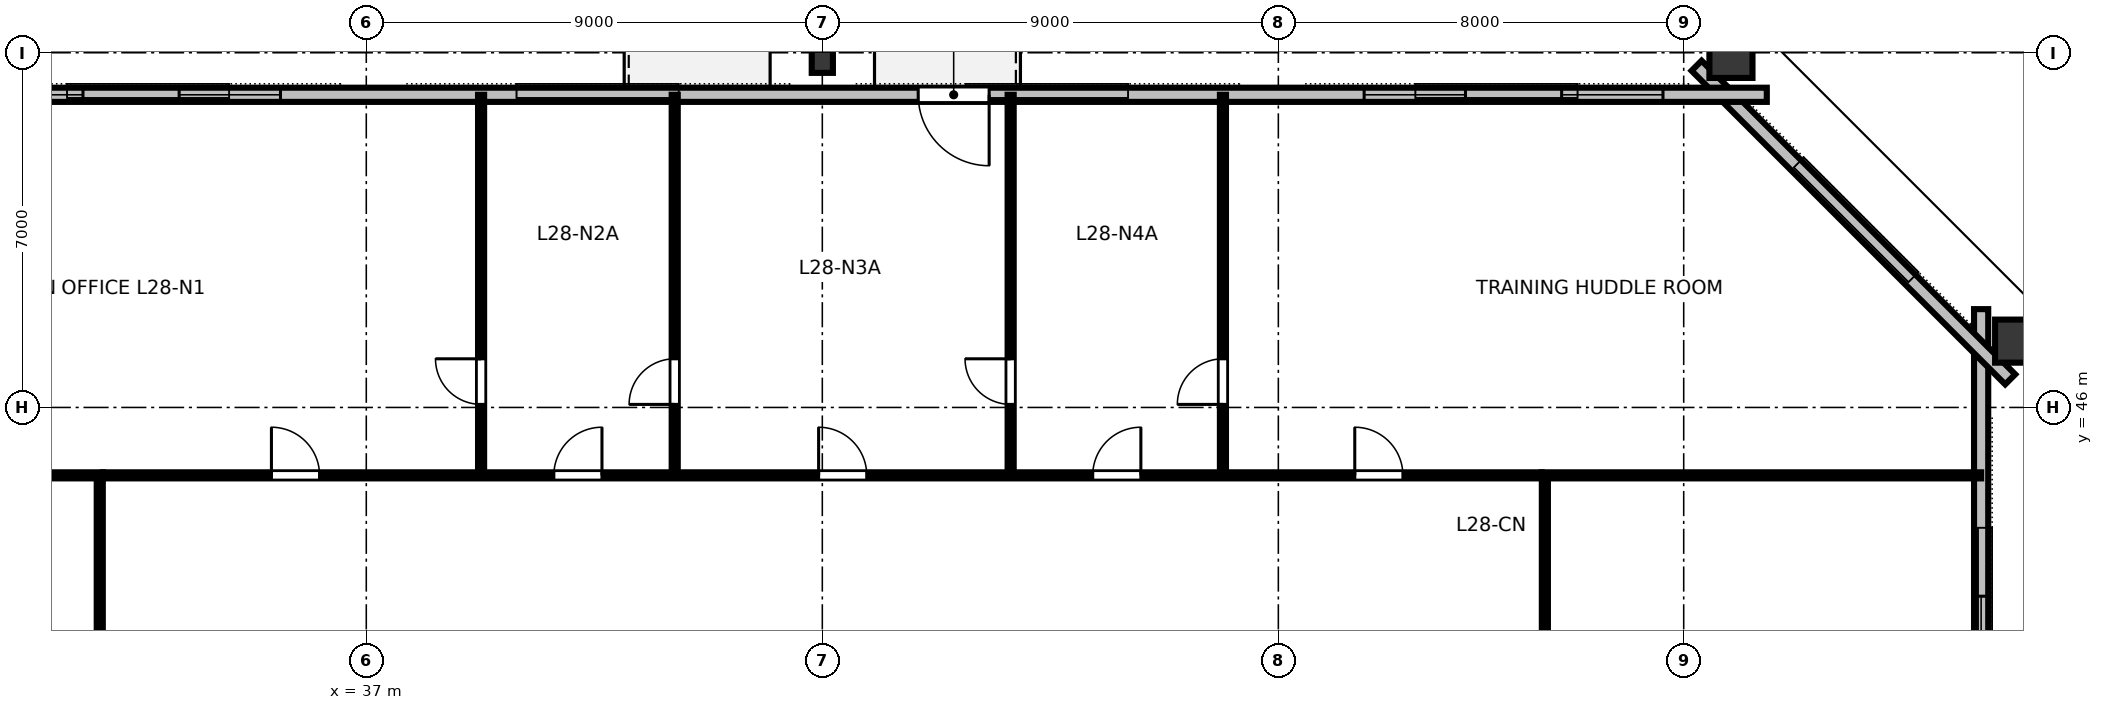
"""IFC4 building model, lengths in metres.
Left out: names, types, materials, properties, quantities, classifications, styles, units other than length and angle.
Written with IfcOpenShell. Run it as: python <this file> out.ifc"""

import sys

from ifc_helpers import new_model, si_unit, direction, frame, frame_2d, origin, origin_2d, place, context, subcontext, project, spatial, rectangle, hollow_rectangle, i_section, extrude, element, fill, save


model = new_model("IFC4")
c1 = context("Model", 3, precision=1e-05, world=origin(), true_north=direction((0.0, 1.0)))
c2 = subcontext(c1, "Body", "Model", "MODEL_VIEW")
j1 = project(units=[si_unit("LENGTHUNIT", "METRE"), si_unit("PLANEANGLEUNIT", "RADIAN")], contexts=[c1])
p1 = place(None, origin())
s1 = spatial("IfcSite", under=j1, at=p1, CompositionType="ELEMENT")
p2 = place(p1, origin())
s2 = spatial("IfcBuilding", under=s1, at=p2, CompositionType="ELEMENT")
p3 = place(p2, frame((0.0, 0.0, 109.6)))
s3 = spatial("IfcBuildingStorey", under=s2, at=p3, CompositionType="ELEMENT", Elevation=109.6)
for number, where, z_axis, x_axis in (
    (1, (69.646, 47.309, 0.0), (0.0, 0.0, 1.0), (0.0, 1.0, 0.0)),
    (2, (63.933, 53.002, 0.0), (0.0, 0.0, 1.0), (1.0, 0.0, 0.0)),
):
    element("IfcColumn", number, at=place(p3, frame(where, z_axis=z_axis, x_axis=x_axis)), inside=s3, PredefinedType="COLUMN", context=c2, shape_type="SweptSolid", body=[
        extrude(hollow_rectangle(XDim=0.85, YDim=1.0, WallThickness=0.05, at=origin_2d()), origin(), (0.0, 0.0, 1.0), 3.358),
    ])
p4 = place(p3, frame((46.0, 52.83, 0.0), z_axis=(0.0, 0.0, 1.0), x_axis=(1.0, 0.0, 0.0)))
e3 = element("IfcColumn", 3, at=p4, inside=s3, PredefinedType="COLUMN", context=c2, shape_type="SweptSolid", body=[
    extrude(i_section(OverallWidth=0.418, OverallDepth=0.455, WebThickness=0.042, FlangeThickness=0.068, FilletRadius=0.025, at=origin_2d()), origin(), (0.0, 0.0, 1.0), 3.358),
])
p5 = place(p3, frame((68.87, 16.06, 0.0), z_axis=(0.0, 0.0, 1.0), x_axis=(0.0, 1.0, 0.0)))
e4 = element("IfcWall", 4, at=p5, inside=s3, PredefinedType="STANDARD", context=c2, shape_type="SweptSolid", body=[
    extrude(rectangle(XDim=31.88, YDim=0.28, at=frame_2d((15.94, 0.0))), origin(), (0.0, 0.0, 1.0), 3.36),
])
p6 = place(p5, frame((5.665, 0.0, 0.8)))
e5 = element("IfcOpeningElement", 5, at=p6, cuts=e4, PredefinedType="OPENING", context=c2, shape_type="SweptSolid", body=[
    extrude(rectangle(XDim=2.0, YDim=1.95, at=frame_2d((1.0, 0.975))), frame((0.0, 0.15, 0.0), z_axis=(0.0, -1.0, 0.0), x_axis=(1.0, 0.0, 0.0)), (0.0, 0.0, 1.0), 0.3),
])
p7 = place(p5, frame((9.375, 0.0, 0.8)))
e6 = element("IfcOpeningElement", 6, at=p7, cuts=e4, PredefinedType="OPENING", context=c2, shape_type="SweptSolid", body=[
    extrude(rectangle(XDim=2.0, YDim=1.95, at=frame_2d((1.0, 0.975))), frame((0.0, 0.15, 0.0), z_axis=(0.0, -1.0, 0.0), x_axis=(1.0, 0.0, 0.0)), (0.0, 0.0, 1.0), 0.3),
])
p8 = place(p5, frame((20.505, 0.0, 0.8)))
e7 = element("IfcOpeningElement", 7, at=p8, cuts=e4, PredefinedType="OPENING", context=c2, shape_type="SweptSolid", body=[
    extrude(rectangle(XDim=2.0, YDim=1.95, at=frame_2d((1.0, 0.975))), frame((0.0, 0.15, 0.0), z_axis=(0.0, -1.0, 0.0), x_axis=(1.0, 0.0, 0.0)), (0.0, 0.0, 1.0), 0.3),
])
p9 = place(p5, frame((24.215, 0.0, 0.8)))
e8 = element("IfcOpeningElement", 8, at=p9, cuts=e4, PredefinedType="OPENING", context=c2, shape_type="SweptSolid", body=[
    extrude(rectangle(XDim=2.0, YDim=1.95, at=frame_2d((1.0, 0.975))), frame((0.0, 0.15, 0.0), z_axis=(0.0, -1.0, 0.0), x_axis=(1.0, 0.0, 0.0)), (0.0, 0.0, 1.0), 0.3),
])
p10 = place(p3, frame((69.444, 46.554, 0.0), z_axis=(0.0, 0.0, 1.0), x_axis=(-0.707106781187, 0.707106781187, 0.0)))
e9 = element("IfcWall", 9, at=p10, inside=s3, PredefinedType="STANDARD", context=c2, shape_type="SweptSolid", body=[
    extrude(rectangle(XDim=8.753, YDim=0.28, at=frame_2d((4.376, 0.0))), origin(), (0.0, 0.0, 1.0), 3.36),
])
p11 = place(p3, frame((64.64, 52.17, 0.0), z_axis=(0.0, 0.0, 1.0), x_axis=(-1.0, 0.0, 0.0)))
e10 = element("IfcWall", 10, at=p11, inside=s3, PredefinedType="STANDARD", context=c2, shape_type="SweptSolid", body=[
    extrude(rectangle(XDim=37.28, YDim=0.28, at=frame_2d((18.64, 0.0))), origin(), (0.0, 0.0, 1.0), 3.36),
])
p12 = place(p11, frame((15.347, 0.0, 0.0)))
e11 = element("IfcOpeningElement", 11, at=p12, cuts=e10, PredefinedType="OPENING", context=c2, shape_type="SweptSolid", body=[
    extrude(rectangle(XDim=1.4, YDim=2.15, at=frame_2d((0.7, 1.075))), frame((0.0, 0.15, 0.0), z_axis=(0.0, -1.0, 0.0), x_axis=(1.0, 0.0, 0.0)), (0.0, 0.0, 1.0), 0.3),
])
p13 = place(p11, frame((2.049, 0.0, 0.8)))
e12 = element("IfcOpeningElement", 12, at=p13, cuts=e10, PredefinedType="OPENING", context=c2, shape_type="SweptSolid", body=[
    extrude(rectangle(XDim=2.0, YDim=1.95, at=frame_2d((1.0, 0.975))), frame((0.0, 0.15, 0.0), z_axis=(0.0, -1.0, 0.0), x_axis=(1.0, 0.0, 0.0)), (0.0, 0.0, 1.0), 0.3),
])
p14 = place(p11, frame((5.947, 0.0, 0.8)))
e13 = element("IfcOpeningElement", 13, at=p14, cuts=e10, PredefinedType="OPENING", context=c2, shape_type="SweptSolid", body=[
    extrude(rectangle(XDim=2.0, YDim=1.95, at=frame_2d((1.0, 0.975))), frame((0.0, 0.15, 0.0), z_axis=(0.0, -1.0, 0.0), x_axis=(1.0, 0.0, 0.0)), (0.0, 0.0, 1.0), 0.3),
])
p15 = place(p11, frame((29.333, 0.0, 0.8)))
e14 = element("IfcOpeningElement", 14, at=p15, cuts=e10, PredefinedType="OPENING", context=c2, shape_type="SweptSolid", body=[
    extrude(rectangle(XDim=2.0, YDim=1.95, at=frame_2d((1.0, 0.975))), frame((0.0, 0.15, 0.0), z_axis=(0.0, -1.0, 0.0), x_axis=(1.0, 0.0, 0.0)), (0.0, 0.0, 1.0), 0.3),
])
p16 = place(p11, frame((33.231, 0.0, 0.8)))
e15 = element("IfcOpeningElement", 15, at=p16, cuts=e10, PredefinedType="OPENING", context=c2, shape_type="SweptSolid", body=[
    extrude(rectangle(XDim=2.0, YDim=1.95, at=frame_2d((1.0, 0.975))), frame((0.0, 0.15, 0.0), z_axis=(0.0, -1.0, 0.0), x_axis=(1.0, 0.0, 0.0)), (0.0, 0.0, 1.0), 0.3),
])
p17 = place(p3, frame((39.266, 44.66, 0.0), z_axis=(0.0, 0.0, 1.0), x_axis=(0.0, 1.0, 0.0)))
e16 = element("IfcWall", 16, at=p17, inside=s3, PredefinedType="PARTITIONING", context=c2, shape_type="SweptSolid", body=[
    extrude(rectangle(XDim=7.51, YDim=0.12, at=frame_2d((3.755, 0.0))), origin(), (0.0, 0.0, 1.0), 2.64),
])
p18 = place(p17, frame((1.4, 0.0, 0.0)))
e17 = element("IfcOpeningElement", 17, at=p18, cuts=e16, PredefinedType="OPENING", context=c2, shape_type="SweptSolid", body=[
    extrude(rectangle(XDim=0.9, YDim=2.15, at=frame_2d((0.45, 1.075))), frame((0.0, 0.07, 0.0), z_axis=(0.0, -1.0, 0.0), x_axis=(1.0, 0.0, 0.0)), (0.0, 0.0, 1.0), 0.14),
])
p19 = place(p3, frame((43.087, 44.66, 0.0), z_axis=(0.0, 0.0, 1.0), x_axis=(0.0, 1.0, 0.0)))
e18 = element("IfcWall", 18, at=p19, inside=s3, PredefinedType="PARTITIONING", context=c2, shape_type="SweptSolid", body=[
    extrude(rectangle(XDim=7.51, YDim=0.12, at=frame_2d((3.755, 0.0))), origin(), (0.0, 0.0, 1.0), 2.64),
])
p20 = place(p19, frame((1.4, 0.0, 0.0)))
e19 = element("IfcOpeningElement", 19, at=p20, cuts=e18, PredefinedType="OPENING", context=c2, shape_type="SweptSolid", body=[
    extrude(rectangle(XDim=0.9, YDim=2.15, at=frame_2d((0.45, 1.075))), frame((0.0, 0.07, 0.0), z_axis=(0.0, -1.0, 0.0), x_axis=(1.0, 0.0, 0.0)), (0.0, 0.0, 1.0), 0.14),
])
p21 = place(p3, frame((49.717, 44.66, 0.0), z_axis=(0.0, 0.0, 1.0), x_axis=(0.0, 1.0, 0.0)))
e20 = element("IfcWall", 20, at=p21, inside=s3, PredefinedType="PARTITIONING", context=c2, shape_type="SweptSolid", body=[
    extrude(rectangle(XDim=7.51, YDim=0.12, at=frame_2d((3.755, 0.0))), origin(), (0.0, 0.0, 1.0), 2.64),
])
p22 = place(p21, frame((1.4, 0.0, 0.0)))
e21 = element("IfcOpeningElement", 21, at=p22, cuts=e20, PredefinedType="OPENING", context=c2, shape_type="SweptSolid", body=[
    extrude(rectangle(XDim=0.9, YDim=2.15, at=frame_2d((0.45, 1.075))), frame((0.0, 0.07, 0.0), z_axis=(0.0, -1.0, 0.0), x_axis=(1.0, 0.0, 0.0)), (0.0, 0.0, 1.0), 0.14),
])
p23 = place(p3, frame((53.906, 44.66, 0.0), z_axis=(0.0, 0.0, 1.0), x_axis=(0.0, 1.0, 0.0)))
e22 = element("IfcWall", 22, at=p23, inside=s3, PredefinedType="PARTITIONING", context=c2, shape_type="SweptSolid", body=[
    extrude(rectangle(XDim=7.51, YDim=0.12, at=frame_2d((3.755, 0.0))), origin(), (0.0, 0.0, 1.0), 2.64),
])
p24 = place(p23, frame((1.4, 0.0, 0.0)))
e23 = element("IfcOpeningElement", 23, at=p24, cuts=e22, PredefinedType="OPENING", context=c2, shape_type="SweptSolid", body=[
    extrude(rectangle(XDim=0.9, YDim=2.15, at=frame_2d((0.45, 1.075))), frame((0.0, 0.07, 0.0), z_axis=(0.0, -1.0, 0.0), x_axis=(1.0, 0.0, 0.0)), (0.0, 0.0, 1.0), 0.14),
])
p25 = place(p3, frame((31.8, 44.66, 0.0), z_axis=(0.0, 0.0, 1.0), x_axis=(1.0, 0.0, 0.0)))
e24 = element("IfcWall", 24, at=p25, inside=s3, PredefinedType="PARTITIONING", context=c2, shape_type="SweptSolid", body=[
    extrude(rectangle(XDim=28.4, YDim=0.12, at=frame_2d((14.2, 0.0))), origin(), (0.0, 0.0, 1.0), 2.64),
])
p26 = place(p25, frame((3.328, 0.0, 0.0)))
e25 = element("IfcOpeningElement", 25, at=p26, cuts=e24, PredefinedType="OPENING", context=c2, shape_type="SweptSolid", body=[
    extrude(rectangle(XDim=0.95, YDim=2.15, at=frame_2d((0.475, 1.075))), frame((0.0, 0.07, 0.0), z_axis=(0.0, -1.0, 0.0), x_axis=(1.0, 0.0, 0.0)), (0.0, 0.0, 1.0), 0.14),
])
p27 = place(p25, frame((8.901, 0.0, 0.0)))
e26 = element("IfcOpeningElement", 26, at=p27, cuts=e24, PredefinedType="OPENING", context=c2, shape_type="SweptSolid", body=[
    extrude(rectangle(XDim=0.95, YDim=2.15, at=frame_2d((0.475, 1.075))), frame((0.0, 0.07, 0.0), z_axis=(0.0, -1.0, 0.0), x_axis=(1.0, 0.0, 0.0)), (0.0, 0.0, 1.0), 0.14),
])
p28 = place(p25, frame((14.127, 0.0, 0.0)))
e27 = element("IfcOpeningElement", 27, at=p28, cuts=e24, PredefinedType="OPENING", context=c2, shape_type="SweptSolid", body=[
    extrude(rectangle(XDim=0.95, YDim=2.15, at=frame_2d((0.475, 1.075))), frame((0.0, 0.07, 0.0), z_axis=(0.0, -1.0, 0.0), x_axis=(1.0, 0.0, 0.0)), (0.0, 0.0, 1.0), 0.14),
])
p29 = place(p25, frame((19.537, 0.0, 0.0)))
e28 = element("IfcOpeningElement", 28, at=p29, cuts=e24, PredefinedType="OPENING", context=c2, shape_type="SweptSolid", body=[
    extrude(rectangle(XDim=0.95, YDim=2.15, at=frame_2d((0.475, 1.075))), frame((0.0, 0.07, 0.0), z_axis=(0.0, -1.0, 0.0), x_axis=(1.0, 0.0, 0.0)), (0.0, 0.0, 1.0), 0.14),
])
p30 = place(p25, frame((24.708, 0.0, 0.0)))
e29 = element("IfcOpeningElement", 29, at=p30, cuts=e24, PredefinedType="OPENING", context=c2, shape_type="SweptSolid", body=[
    extrude(rectangle(XDim=0.95, YDim=2.15, at=frame_2d((0.475, 1.075))), frame((0.0, 0.07, 0.0), z_axis=(0.0, -1.0, 0.0), x_axis=(1.0, 0.0, 0.0)), (0.0, 0.0, 1.0), 0.14),
])
p31 = place(p3, frame((31.74, 33.02, 0.0), z_axis=(0.0, 0.0, 1.0), x_axis=(0.0, 1.0, 0.0)))
e30 = element("IfcWall", 30, at=p31, inside=s3, PredefinedType="PARTITIONING", context=c2, shape_type="SweptSolid", body=[
    extrude(rectangle(XDim=11.58, YDim=0.12, at=frame_2d((5.79, 0.0))), origin(), (0.0, 0.0, 1.0), 2.64),
])
p32 = place(p31, frame((5.215, 0.0, 0.0)))
e31 = element("IfcOpeningElement", 31, at=p32, cuts=e30, PredefinedType="OPENING", context=c2, shape_type="SweptSolid", body=[
    extrude(rectangle(XDim=0.95, YDim=2.15, at=frame_2d((0.475, 1.075))), frame((0.0, 0.07, 0.0), z_axis=(0.0, -1.0, 0.0), x_axis=(1.0, 0.0, 0.0)), (0.0, 0.0, 1.0), 0.14),
])
p33 = place(p3, frame((60.26, 33.02, 0.0), z_axis=(0.0, 0.0, 1.0), x_axis=(0.0, 1.0, 0.0)))
e32 = element("IfcWall", 32, at=p33, inside=s3, PredefinedType="PARTITIONING", context=c2, shape_type="SweptSolid", body=[
    extrude(rectangle(XDim=11.58, YDim=0.12, at=frame_2d((5.79, 0.0))), origin(), (0.0, 0.0, 1.0), 2.64),
])
p34 = place(p33, frame((5.337, 0.0, 0.0)))
e33 = element("IfcOpeningElement", 33, at=p34, cuts=e32, PredefinedType="OPENING", context=c2, shape_type="SweptSolid", body=[
    extrude(rectangle(XDim=0.95, YDim=2.15, at=frame_2d((0.475, 1.075))), frame((0.0, 0.07, 0.0), z_axis=(0.0, -1.0, 0.0), x_axis=(1.0, 0.0, 0.0)), (0.0, 0.0, 1.0), 0.14),
])
for number, where, z_axis, x_axis in (
    (34, (31.8, 44.66, 0.0), (0.0, 0.0, 1.0), (-1.0, 0.0, 0.0)),
    (35, (60.2, 44.66, 0.0), (0.0, 0.0, 1.0), (1.0, 0.0, 0.0)),
):
    element("IfcWall", number, at=place(p3, frame(where, z_axis=z_axis, x_axis=x_axis)), inside=s3, PredefinedType="PARTITIONING", context=c2, shape_type="SweptSolid", body=[
        extrude(rectangle(XDim=8.67, YDim=0.12, at=frame_2d((4.335, 0.0))), origin(), (0.0, 0.0, 1.0), 2.64),
    ])
p35 = place(p9, origin())
e36 = element("IfcWindow", 36, at=p35, inside=s3, PartitioningType="SINGLE_PANEL", PredefinedType="WINDOW", context=c2, shape_type="SweptSolid", body=[
    extrude(rectangle(XDim=2.0, YDim=1.95, at=frame_2d((1.0, 0.975))), frame((0.0, 0.03, 0.0), z_axis=(0.0, -1.0, 0.0), x_axis=(1.0, 0.0, 0.0)), (0.0, 0.0, 1.0), 0.06),
])
fill(e8, e36)
p36 = place(p12, origin())
e37 = element("IfcDoor", 37, at=p36, inside=s3, OperationType="SINGLE_SWING_LEFT", PredefinedType="DOOR", context=c2, shape_type="SweptSolid", body=[
    extrude(rectangle(XDim=1.4, YDim=2.15, at=frame_2d((0.7, 1.075))), frame((0.0, 0.025, 0.0), z_axis=(0.0, -1.0, 0.0), x_axis=(1.0, 0.0, 0.0)), (0.0, 0.0, 1.0), 0.05),
])
fill(e11, e37)
p37 = place(p13, origin())
e38 = element("IfcWindow", 38, at=p37, inside=s3, PartitioningType="SINGLE_PANEL", PredefinedType="WINDOW", context=c2, shape_type="SweptSolid", body=[
    extrude(rectangle(XDim=2.0, YDim=1.95, at=frame_2d((1.0, 0.975))), frame((0.0, 0.03, 0.0), z_axis=(0.0, -1.0, 0.0), x_axis=(1.0, 0.0, 0.0)), (0.0, 0.0, 1.0), 0.06),
])
fill(e12, e38)
p38 = place(p14, origin())
e39 = element("IfcWindow", 39, at=p38, inside=s3, PartitioningType="SINGLE_PANEL", PredefinedType="WINDOW", context=c2, shape_type="SweptSolid", body=[
    extrude(rectangle(XDim=2.0, YDim=1.95, at=frame_2d((1.0, 0.975))), frame((0.0, 0.03, 0.0), z_axis=(0.0, -1.0, 0.0), x_axis=(1.0, 0.0, 0.0)), (0.0, 0.0, 1.0), 0.06),
])
fill(e13, e39)
p39 = place(p15, origin())
e40 = element("IfcWindow", 40, at=p39, inside=s3, PartitioningType="SINGLE_PANEL", PredefinedType="WINDOW", context=c2, shape_type="SweptSolid", body=[
    extrude(rectangle(XDim=2.0, YDim=1.95, at=frame_2d((1.0, 0.975))), frame((0.0, 0.03, 0.0), z_axis=(0.0, -1.0, 0.0), x_axis=(1.0, 0.0, 0.0)), (0.0, 0.0, 1.0), 0.06),
])
fill(e14, e40)
p40 = place(p16, origin())
e41 = element("IfcWindow", 41, at=p40, inside=s3, PartitioningType="SINGLE_PANEL", PredefinedType="WINDOW", context=c2, shape_type="SweptSolid", body=[
    extrude(rectangle(XDim=2.0, YDim=1.95, at=frame_2d((1.0, 0.975))), frame((0.0, 0.03, 0.0), z_axis=(0.0, -1.0, 0.0), x_axis=(1.0, 0.0, 0.0)), (0.0, 0.0, 1.0), 0.06),
])
fill(e15, e41)
p41 = place(p18, origin())
e42 = element("IfcDoor", 42, at=p41, inside=s3, OperationType="SINGLE_SWING_RIGHT", PredefinedType="DOOR", context=c2, shape_type="SweptSolid", body=[
    extrude(rectangle(XDim=0.9, YDim=2.15, at=frame_2d((0.45, 1.075))), frame((0.0, 0.025, 0.0), z_axis=(0.0, -1.0, 0.0), x_axis=(1.0, 0.0, 0.0)), (0.0, 0.0, 1.0), 0.05),
])
fill(e17, e42)
p42 = place(p20, origin())
e43 = element("IfcDoor", 43, at=p42, inside=s3, OperationType="SINGLE_SWING_LEFT", PredefinedType="DOOR", context=c2, shape_type="SweptSolid", body=[
    extrude(rectangle(XDim=0.9, YDim=2.15, at=frame_2d((0.45, 1.075))), frame((0.0, 0.025, 0.0), z_axis=(0.0, -1.0, 0.0), x_axis=(1.0, 0.0, 0.0)), (0.0, 0.0, 1.0), 0.05),
])
fill(e19, e43)
p43 = place(p22, origin())
e44 = element("IfcDoor", 44, at=p43, inside=s3, OperationType="SINGLE_SWING_RIGHT", PredefinedType="DOOR", context=c2, shape_type="SweptSolid", body=[
    extrude(rectangle(XDim=0.9, YDim=2.15, at=frame_2d((0.45, 1.075))), frame((0.0, 0.025, 0.0), z_axis=(0.0, -1.0, 0.0), x_axis=(1.0, 0.0, 0.0)), (0.0, 0.0, 1.0), 0.05),
])
fill(e21, e44)
p44 = place(p24, origin())
e45 = element("IfcDoor", 45, at=p44, inside=s3, OperationType="SINGLE_SWING_LEFT", PredefinedType="DOOR", context=c2, shape_type="SweptSolid", body=[
    extrude(rectangle(XDim=0.9, YDim=2.15, at=frame_2d((0.45, 1.075))), frame((0.0, 0.025, 0.0), z_axis=(0.0, -1.0, 0.0), x_axis=(1.0, 0.0, 0.0)), (0.0, 0.0, 1.0), 0.05),
])
fill(e23, e45)
p45 = place(p26, origin())
e46 = element("IfcDoor", 46, at=p45, inside=s3, OperationType="SINGLE_SWING_LEFT", PredefinedType="DOOR", context=c2, shape_type="SweptSolid", body=[
    extrude(rectangle(XDim=0.95, YDim=2.15, at=frame_2d((0.475, 1.075))), frame((0.0, 0.025, 0.0), z_axis=(0.0, -1.0, 0.0), x_axis=(1.0, 0.0, 0.0)), (0.0, 0.0, 1.0), 0.05),
])
fill(e25, e46)
p46 = place(p27, origin())
e47 = element("IfcDoor", 47, at=p46, inside=s3, OperationType="SINGLE_SWING_RIGHT", PredefinedType="DOOR", context=c2, shape_type="SweptSolid", body=[
    extrude(rectangle(XDim=0.95, YDim=2.15, at=frame_2d((0.475, 1.075))), frame((0.0, 0.025, 0.0), z_axis=(0.0, -1.0, 0.0), x_axis=(1.0, 0.0, 0.0)), (0.0, 0.0, 1.0), 0.05),
])
fill(e26, e47)
p47 = place(p28, origin())
e48 = element("IfcDoor", 48, at=p47, inside=s3, OperationType="SINGLE_SWING_LEFT", PredefinedType="DOOR", context=c2, shape_type="SweptSolid", body=[
    extrude(rectangle(XDim=0.95, YDim=2.15, at=frame_2d((0.475, 1.075))), frame((0.0, 0.025, 0.0), z_axis=(0.0, -1.0, 0.0), x_axis=(1.0, 0.0, 0.0)), (0.0, 0.0, 1.0), 0.05),
])
fill(e27, e48)
p48 = place(p29, origin())
e49 = element("IfcDoor", 49, at=p48, inside=s3, OperationType="SINGLE_SWING_RIGHT", PredefinedType="DOOR", context=c2, shape_type="SweptSolid", body=[
    extrude(rectangle(XDim=0.95, YDim=2.15, at=frame_2d((0.475, 1.075))), frame((0.0, 0.025, 0.0), z_axis=(0.0, -1.0, 0.0), x_axis=(1.0, 0.0, 0.0)), (0.0, 0.0, 1.0), 0.05),
])
fill(e28, e49)
p49 = place(p30, origin())
e50 = element("IfcDoor", 50, at=p49, inside=s3, OperationType="SINGLE_SWING_LEFT", PredefinedType="DOOR", context=c2, shape_type="SweptSolid", body=[
    extrude(rectangle(XDim=0.95, YDim=2.15, at=frame_2d((0.475, 1.075))), frame((0.0, 0.025, 0.0), z_axis=(0.0, -1.0, 0.0), x_axis=(1.0, 0.0, 0.0)), (0.0, 0.0, 1.0), 0.05),
])
fill(e29, e50)
save(model, sys.argv[1])
